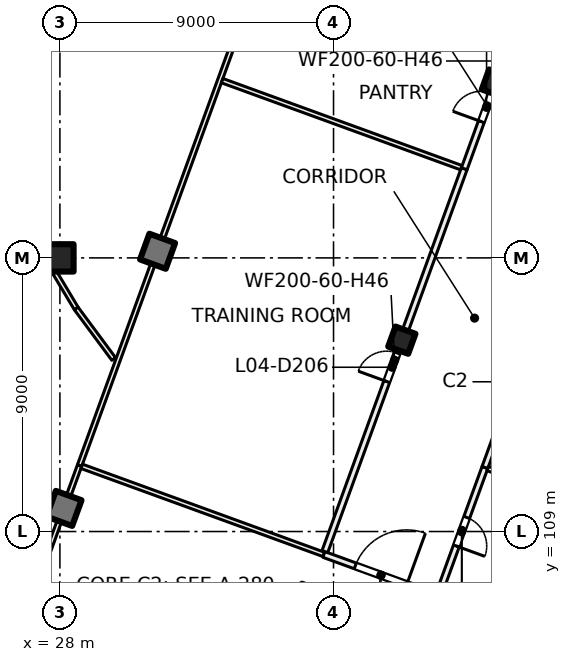
"""IFC4 building model, lengths in metres.
Left out: names, types, materials, properties, quantities, classifications, styles, units other than length and angle.
Written with IfcOpenShell. Run it as: python <this file> out.ifc"""

import sys

from ifc_helpers import new_model, si_unit, direction, frame, frame_2d, origin, origin_2d, place, context, subcontext, project, spatial, rectangle, extrude, element, fill, save


model = new_model("IFC4")
c1 = context("Model", 3, precision=1e-05, world=origin(), true_north=direction((0.0, 1.0)))
c2 = subcontext(c1, "Body", "Model", "MODEL_VIEW")
j1 = project(units=[si_unit("LENGTHUNIT", "METRE"), si_unit("PLANEANGLEUNIT", "RADIAN")], contexts=[c1])
p1 = place(None, origin())
s1 = spatial("IfcSite", under=j1, at=p1, CompositionType="ELEMENT")
p2 = place(p1, origin())
s2 = spatial("IfcBuilding", under=s1, at=p2, CompositionType="ELEMENT")
p3 = place(p2, frame((0.0, 0.0, 22.5)))
s3 = spatial("IfcBuildingStorey", under=s2, at=p3, CompositionType="ELEMENT", Elevation=22.5)
p4 = place(p3, frame((28.0, 118.0, 0.0), z_axis=(0.0, 0.0, 1.0), x_axis=(1.0, 0.0, 0.0)))
e1 = element("IfcColumn", 1, at=p4, inside=s3, PredefinedType="COLUMN", context=c2, shape_type="SweptSolid", body=[
    extrude(rectangle(XDim=0.9, YDim=0.9, at=origin_2d()), origin(), (0.0, 0.0, 1.0), 5.0),
])
for number, where, z_axis, x_axis in (
    (2, (42.325, 123.751, 0.0), (0.0, 0.0, 1.0), (-0.342, -0.94, 0.0)),
    (3, (39.247, 115.293, 0.0), (0.0, 0.0, 1.0), (-0.342, -0.94, 0.0)),
):
    element("IfcColumn", number, at=place(p3, frame(where, z_axis=z_axis, x_axis=x_axis)), inside=s3, PredefinedType="COLUMN", context=c2, shape_type="SweptSolid", body=[
        extrude(rectangle(XDim=0.7, YDim=0.7, at=origin_2d()), origin(), (0.0, 0.0, 1.0), 5.0),
    ])
for number, where, z_axis, x_axis in (
    (4, (31.212, 118.218, 0.0), (0.0, 0.0, 1.0), (-0.342, -0.94, 0.0)),
    (5, (28.134, 109.76, 0.0), (0.0, 0.0, 1.0), (-0.342, -0.94, 0.0)),
):
    element("IfcColumn", number, at=place(p3, frame(where, z_axis=z_axis, x_axis=x_axis)), inside=s3, PredefinedType="COLUMN", context=c2, shape_type="SweptSolid", body=[
        extrude(rectangle(XDim=0.9, YDim=0.9, at=origin_2d()), origin(), (0.0, 0.0, 1.0), 5.0),
    ])
p5 = place(p3, frame((12.199, 89.809, 0.0), z_axis=(0.0, 0.0, 1.0), x_axis=(0.342022998908, 0.939691581434, 0.0)))
e6 = element("IfcWall", 6, at=p5, inside=s3, PredefinedType="SOLIDWALL", context=c2, shape_type="SweptSolid", body=[
    extrude(rectangle(XDim=47.334, YDim=0.6, at=frame_2d((23.667, 0.0))), origin(), (0.0, 0.0, 1.0), 4.625),
])
p6 = place(p5, frame((0.773, 0.0, 0.9)))
e7 = element("IfcOpeningElement", 7, at=p6, cuts=e6, PredefinedType="OPENING", context=c2, shape_type="SweptSolid", body=[
    extrude(rectangle(XDim=3.0, YDim=3.0, at=frame_2d((1.5, 1.5))), frame((0.0, 0.31, 0.0), z_axis=(0.0, -1.0, 0.0), x_axis=(1.0, 0.0, 0.0)), (0.0, 0.0, 1.0), 0.62),
])
p7 = place(p5, frame((5.379, 0.0, 0.9)))
e8 = element("IfcOpeningElement", 8, at=p7, cuts=e6, PredefinedType="OPENING", context=c2, shape_type="SweptSolid", body=[
    extrude(rectangle(XDim=3.0, YDim=3.0, at=frame_2d((1.5, 1.5))), frame((0.0, 0.31, 0.0), z_axis=(0.0, -1.0, 0.0), x_axis=(1.0, 0.0, 0.0)), (0.0, 0.0, 1.0), 0.62),
])
p8 = place(p5, frame((9.235, 0.0, 0.9)))
e9 = element("IfcOpeningElement", 9, at=p8, cuts=e6, PredefinedType="OPENING", context=c2, shape_type="SweptSolid", body=[
    extrude(rectangle(XDim=3.0, YDim=3.0, at=frame_2d((1.5, 1.5))), frame((0.0, 0.31, 0.0), z_axis=(0.0, -1.0, 0.0), x_axis=(1.0, 0.0, 0.0)), (0.0, 0.0, 1.0), 0.62),
])
p9 = place(p5, frame((13.99, 0.0, 0.9)))
e10 = element("IfcOpeningElement", 10, at=p9, cuts=e6, PredefinedType="OPENING", context=c2, shape_type="SweptSolid", body=[
    extrude(rectangle(XDim=3.0, YDim=3.0, at=frame_2d((1.5, 1.5))), frame((0.0, 0.31, 0.0), z_axis=(0.0, -1.0, 0.0), x_axis=(1.0, 0.0, 0.0)), (0.0, 0.0, 1.0), 0.62),
])
p10 = place(p5, frame((18.118, 0.0, 0.9)))
e11 = element("IfcOpeningElement", 11, at=p10, cuts=e6, PredefinedType="OPENING", context=c2, shape_type="SweptSolid", body=[
    extrude(rectangle(XDim=1.2, YDim=3.0, at=frame_2d((0.6, 1.5))), frame((0.0, 0.31, 0.0), z_axis=(0.0, -1.0, 0.0), x_axis=(1.0, 0.0, 0.0)), (0.0, 0.0, 1.0), 0.62),
])
p11 = place(p5, frame((19.618, 0.0, 0.9)))
e12 = element("IfcOpeningElement", 12, at=p11, cuts=e6, PredefinedType="OPENING", context=c2, shape_type="SweptSolid", body=[
    extrude(rectangle(XDim=1.2, YDim=3.0, at=frame_2d((0.6, 1.5))), frame((0.0, 0.31, 0.0), z_axis=(0.0, -1.0, 0.0), x_axis=(1.0, 0.0, 0.0)), (0.0, 0.0, 1.0), 0.62),
])
p12 = place(p5, frame((22.452, 0.0, 0.9)))
e13 = element("IfcOpeningElement", 13, at=p12, cuts=e6, PredefinedType="OPENING", context=c2, shape_type="SweptSolid", body=[
    extrude(rectangle(XDim=3.0, YDim=3.0, at=frame_2d((1.5, 1.5))), frame((0.0, 0.31, 0.0), z_axis=(0.0, -1.0, 0.0), x_axis=(1.0, 0.0, 0.0)), (0.0, 0.0, 1.0), 0.62),
])
p13 = place(p5, frame((26.458, 0.0, 0.9)))
e14 = element("IfcOpeningElement", 14, at=p13, cuts=e6, PredefinedType="OPENING", context=c2, shape_type="SweptSolid", body=[
    extrude(rectangle(XDim=3.0, YDim=3.0, at=frame_2d((1.5, 1.5))), frame((0.0, 0.31, 0.0), z_axis=(0.0, -1.0, 0.0), x_axis=(1.0, 0.0, 0.0)), (0.0, 0.0, 1.0), 0.62),
])
p14 = place(p5, frame((31.064, 0.0, 0.9)))
e15 = element("IfcOpeningElement", 15, at=p14, cuts=e6, PredefinedType="OPENING", context=c2, shape_type="SweptSolid", body=[
    extrude(rectangle(XDim=3.0, YDim=3.0, at=frame_2d((1.5, 1.5))), frame((0.0, 0.31, 0.0), z_axis=(0.0, -1.0, 0.0), x_axis=(1.0, 0.0, 0.0)), (0.0, 0.0, 1.0), 0.62),
])
p15 = place(p5, frame((36.029, 0.0, 0.9)))
e16 = element("IfcOpeningElement", 16, at=p15, cuts=e6, PredefinedType="OPENING", context=c2, shape_type="SweptSolid", body=[
    extrude(rectangle(XDim=1.2, YDim=3.0, at=frame_2d((0.6, 1.5))), frame((0.0, 0.31, 0.0), z_axis=(0.0, -1.0, 0.0), x_axis=(1.0, 0.0, 0.0)), (0.0, 0.0, 1.0), 0.62),
])
p16 = place(p5, frame((39.676, 0.0, 0.9)))
e17 = element("IfcOpeningElement", 17, at=p16, cuts=e6, PredefinedType="OPENING", context=c2, shape_type="SweptSolid", body=[
    extrude(rectangle(XDim=3.0, YDim=3.0, at=frame_2d((1.5, 1.5))), frame((0.0, 0.31, 0.0), z_axis=(0.0, -1.0, 0.0), x_axis=(1.0, 0.0, 0.0)), (0.0, 0.0, 1.0), 0.62),
])
p17 = place(p5, frame((43.531, 0.0, 0.9)))
e18 = element("IfcOpeningElement", 18, at=p17, cuts=e6, PredefinedType="OPENING", context=c2, shape_type="SweptSolid", body=[
    extrude(rectangle(XDim=3.0, YDim=3.0, at=frame_2d((1.5, 1.5))), frame((0.0, 0.31, 0.0), z_axis=(0.0, -1.0, 0.0), x_axis=(1.0, 0.0, 0.0)), (0.0, 0.0, 1.0), 0.62),
])
p18 = place(p3, frame((27.0, 106.644, 0.0), z_axis=(0.0, 0.0, 1.0), x_axis=(0.341962838947, 0.939713475896, 0.0)))
e19 = element("IfcWall", 19, at=p18, inside=s3, PredefinedType="PARTITIONING", context=c2, shape_type="SweptSolid", body=[
    extrude(rectangle(XDim=4.816, YDim=0.15, at=frame_2d((2.408, 0.0))), origin(), (0.0, 0.0, 1.0), 4.625),
])
p19 = place(p3, frame((27.478, 118.104, 0.0), z_axis=(0.0, 0.0, 1.0), x_axis=(0.514009565734, -0.857784452141, 0.0)))
e20 = element("IfcWall", 20, at=p19, inside=s3, PredefinedType="PARTITIONING", context=c2, shape_type="SweptSolid", body=[
    extrude(rectangle(XDim=2.068, YDim=0.15, at=frame_2d((1.034, 0.0))), origin(), (0.0, 0.0, 1.0), 4.625),
])
p20 = place(p3, frame((28.537, 116.336, 0.0), z_axis=(0.0, 0.0, 1.0), x_axis=(0.595741297031, -0.80317638599, 0.0)))
e21 = element("IfcWall", 21, at=p20, inside=s3, PredefinedType="PARTITIONING", context=c2, shape_type="SweptSolid", body=[
    extrude(rectangle(XDim=2.068, YDim=0.15, at=frame_2d((1.034, 0.0))), origin(), (0.0, 0.0, 1.0), 4.625),
])
p21 = place(p3, frame((28.647, 111.17, 0.0), z_axis=(0.0, 0.0, 1.0), x_axis=(0.342087921954, 0.939667948614, 0.0)))
e22 = element("IfcWall", 22, at=p21, inside=s3, PredefinedType="PARTITIONING", context=c2, shape_type="SweptSolid", body=[
    extrude(rectangle(XDim=18.075, YDim=0.15, at=frame_2d((9.037, 0.0))), origin(), (0.0, 0.0, 1.0), 4.625),
])
p22 = place(p3, frame((28.717, 111.144, 0.0), z_axis=(0.0, 0.0, 1.0), x_axis=(0.939731172492, -0.341914204803, 0.0)))
e23 = element("IfcWall", 23, at=p22, inside=s3, PredefinedType="PARTITIONING", context=c2, shape_type="SweptSolid", body=[
    extrude(rectangle(XDim=8.476, YDim=0.15, at=frame_2d((4.238, 0.0))), origin(), (0.0, 0.0, 1.0), 4.625),
])
p23 = place(p3, frame((33.335, 123.83, 0.0), z_axis=(0.0, 0.0, 1.0), x_axis=(0.939710837098, -0.341970090272, 0.0)))
e24 = element("IfcWall", 24, at=p23, inside=s3, PredefinedType="PARTITIONING", context=c2, shape_type="SweptSolid", body=[
    extrude(rectangle(XDim=8.375, YDim=0.15, at=frame_2d((4.188, 0.0))), origin(), (0.0, 0.0, 1.0), 4.625),
])
p24 = place(p3, frame((40.44, 106.878, 0.0), z_axis=(0.0, 0.0, 1.0), x_axis=(-0.939665029144, 0.342095941228, 0.0)))
e25 = element("IfcWall", 25, at=p24, inside=s3, PredefinedType="PARTITIONING", context=c2, shape_type="SweptSolid", body=[
    extrude(rectangle(XDim=3.999, YDim=0.2, at=frame_2d((2.0, 0.0))), origin(), (0.0, 0.0, 1.0), 4.625),
])
p25 = place(p24, frame((1.099, 0.0, 0.0)))
e26 = element("IfcOpeningElement", 26, at=p25, cuts=e25, PredefinedType="OPENING", context=c2, shape_type="SweptSolid", body=[
    extrude(rectangle(XDim=1.8, YDim=2.1, at=frame_2d((0.9, 1.05))), frame((0.0, 0.11, 0.0), z_axis=(0.0, -1.0, 0.0), x_axis=(1.0, 0.0, 0.0)), (0.0, 0.0, 1.0), 0.22),
])
p26 = place(p3, frame((36.716, 108.34, 0.0), z_axis=(0.0, 0.0, 1.0), x_axis=(0.342018071111, 0.939693375008, 0.0)))
e27 = element("IfcWall", 27, at=p26, inside=s3, PredefinedType="PARTITIONING", context=c2, shape_type="SweptSolid", body=[
    extrude(rectangle(XDim=13.4, YDim=0.2, at=frame_2d((6.7, 0.0))), origin(), (0.0, 0.0, 1.0), 4.625),
])
p27 = place(p26, frame((5.952, 0.0, 0.0)))
e28 = element("IfcOpeningElement", 28, at=p27, cuts=e27, PredefinedType="OPENING", context=c2, shape_type="SweptSolid", body=[
    extrude(rectangle(XDim=1.0, YDim=2.1, at=frame_2d((0.5, 1.05))), frame((0.0, 0.11, 0.0), z_axis=(0.0, -1.0, 0.0), x_axis=(1.0, 0.0, 0.0)), (0.0, 0.0, 1.0), 0.22),
])
p28 = place(p3, frame((41.98, 111.106, 0.0), z_axis=(0.0, 0.0, 1.0), x_axis=(-0.342259834227, -0.93960534581, 0.0)))
e29 = element("IfcWall", 29, at=p28, inside=s3, PredefinedType="PARTITIONING", context=c2, shape_type="SweptSolid", body=[
    extrude(rectangle(XDim=4.4, YDim=0.2, at=frame_2d((2.2, 0.0))), origin(), (0.0, 0.0, 1.0), 4.625),
])
p29 = place(p28, frame((1.748, 0.0, 0.0)))
e30 = element("IfcOpeningElement", 30, at=p29, cuts=e29, PredefinedType="OPENING", context=c2, shape_type="SweptSolid", body=[
    extrude(rectangle(XDim=1.0, YDim=2.1, at=frame_2d((0.5, 1.05))), frame((0.0, 0.11, 0.0), z_axis=(0.0, -1.0, 0.0), x_axis=(1.0, 0.0, 0.0)), (0.0, 0.0, 1.0), 0.22),
])
p30 = place(p3, frame((41.299, 120.932, 0.0), z_axis=(0.0, 0.0, 1.0), x_axis=(0.342063854115, 0.939676710208, 0.0)))
e31 = element("IfcWall", 31, at=p30, inside=s3, PredefinedType="PARTITIONING", context=c2, shape_type="SweptSolid", body=[
    extrude(rectangle(XDim=4.399, YDim=0.2, at=frame_2d((2.2, 0.0))), origin(), (0.0, 0.0, 1.0), 4.625),
])
p31 = place(p30, frame((1.648, 0.0, 0.0)))
e32 = element("IfcOpeningElement", 32, at=p31, cuts=e31, PredefinedType="OPENING", context=c2, shape_type="SweptSolid", body=[
    extrude(rectangle(XDim=1.0, YDim=2.1, at=frame_2d((0.5, 1.05))), frame((0.0, 0.11, 0.0), z_axis=(0.0, -1.0, 0.0), x_axis=(1.0, 0.0, 0.0)), (0.0, 0.0, 1.0), 0.22),
])
p32 = place(p3, frame((46.563, 123.698, 0.0), z_axis=(0.0, 0.0, 1.0), x_axis=(-0.342012215574, -0.939695506214, 0.0)))
e33 = element("IfcWall", 33, at=p32, inside=s3, PredefinedType="PARTITIONING", context=c2, shape_type="SweptSolid", body=[
    extrude(rectangle(XDim=13.4, YDim=0.2, at=frame_2d((6.7, 0.0))), origin(), (0.0, 0.0, 1.0), 4.625),
])
p33 = place(p32, frame((6.152, 0.0, 0.0)))
e34 = element("IfcOpeningElement", 34, at=p33, cuts=e33, PredefinedType="OPENING", context=c2, shape_type="SweptSolid", body=[
    extrude(rectangle(XDim=1.0, YDim=2.1, at=frame_2d((0.5, 1.05))), frame((0.0, 0.11, 0.0), z_axis=(0.0, -1.0, 0.0), x_axis=(1.0, 0.0, 0.0)), (0.0, 0.0, 1.0), 0.22),
])
p34 = place(p3, frame((42.074, 111.072, 0.0), z_axis=(0.0, 0.0, 1.0), x_axis=(0.939710837098, -0.341970090272, 0.0)))
e35 = element("IfcWall", 35, at=p34, inside=s3, PredefinedType="PARTITIONING", context=c2, shape_type="SweptSolid", body=[
    extrude(rectangle(XDim=8.375, YDim=0.15, at=frame_2d((4.188, 0.0))), origin(), (0.0, 0.0, 1.0), 4.625),
])
p35 = place(p25, origin())
e36 = element("IfcDoor", 36, at=p35, inside=s3, OperationType="DOUBLE_DOOR_SINGLE_SWING", PredefinedType="DOOR", context=c2, shape_type="SweptSolid", body=[
    extrude(rectangle(XDim=1.8, YDim=2.1, at=frame_2d((0.9, 1.05))), frame((0.0, 0.025, 0.0), z_axis=(0.0, -1.0, 0.0), x_axis=(1.0, 0.0, 0.0)), (0.0, 0.0, 1.0), 0.05),
])
fill(e26, e36)
p36 = place(p27, origin())
e37 = element("IfcDoor", 37, at=p36, inside=s3, OperationType="SINGLE_SWING_LEFT", PredefinedType="DOOR", context=c2, shape_type="SweptSolid", body=[
    extrude(rectangle(XDim=1.0, YDim=2.1, at=frame_2d((0.5, 1.05))), frame((0.0, 0.025, 0.0), z_axis=(0.0, -1.0, 0.0), x_axis=(1.0, 0.0, 0.0)), (0.0, 0.0, 1.0), 0.05),
])
fill(e28, e37)
p37 = place(p29, origin())
e38 = element("IfcDoor", 38, at=p37, inside=s3, OperationType="SINGLE_SWING_RIGHT", PredefinedType="DOOR", context=c2, shape_type="SweptSolid", body=[
    extrude(rectangle(XDim=1.0, YDim=2.1, at=frame_2d((0.5, 1.05))), frame((0.0, 0.025, 0.0), z_axis=(0.0, -1.0, 0.0), x_axis=(1.0, 0.0, 0.0)), (0.0, 0.0, 1.0), 0.05),
])
fill(e30, e38)
p38 = place(p31, origin())
e39 = element("IfcDoor", 39, at=p38, inside=s3, OperationType="SINGLE_SWING_LEFT", PredefinedType="DOOR", context=c2, shape_type="SweptSolid", body=[
    extrude(rectangle(XDim=1.0, YDim=2.1, at=frame_2d((0.5, 1.05))), frame((0.0, 0.025, 0.0), z_axis=(0.0, -1.0, 0.0), x_axis=(1.0, 0.0, 0.0)), (0.0, 0.0, 1.0), 0.05),
])
fill(e32, e39)
save(model, sys.argv[1])
